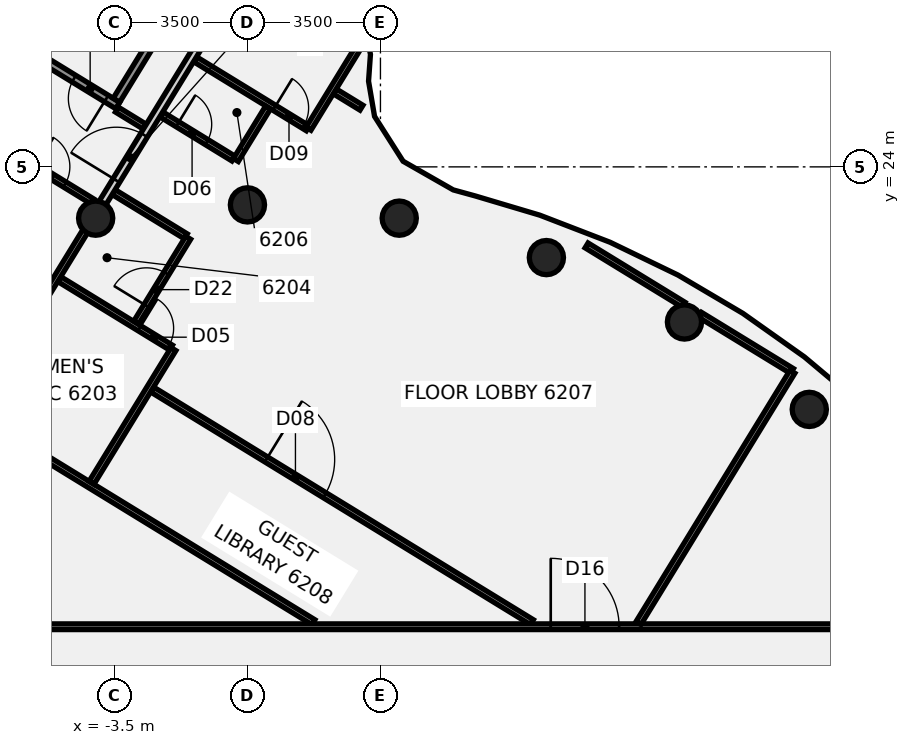
"""IFC4 building model, lengths in metres.
Left out: names, types, materials, properties, quantities, classifications, styles, units other than length and angle.
Written with IfcOpenShell. Run it as: python <this file> out.ifc"""

import sys

from ifc_helpers import new_model, si_unit, direction, frame, frame_2d, origin, origin_2d, place, context, subcontext, project, spatial, rectangle, circle, extrude, element, fill, save


model = new_model("IFC4")
c1 = context("Model", 3, precision=1e-05, world=origin(), true_north=direction((0.0, 1.0)))
c2 = subcontext(c1, "Body", "Model", "MODEL_VIEW")
j1 = project(units=[si_unit("LENGTHUNIT", "METRE"), si_unit("PLANEANGLEUNIT", "RADIAN")], contexts=[c1])
p1 = place(None, origin())
s1 = spatial("IfcSite", under=j1, at=p1, CompositionType="ELEMENT")
p2 = place(p1, origin())
s2 = spatial("IfcBuilding", under=s1, at=p2, CompositionType="ELEMENT")
p3 = place(p2, frame((0.0, 0.0, 245.1)))
s3 = spatial("IfcBuildingStorey", under=s2, at=p3, CompositionType="ELEMENT", Elevation=245.1)
for number, where, z_axis, x_axis in (
    (1, (14.784, 17.619, -0.14), (0.0, 0.0, 1.0), (1.0, 0.0, 0.0)),
    (2, (11.5, 19.919, -0.14), (0.0, 0.0, 1.0), (1.0, 0.0, 0.0)),
    (3, (7.866, 21.613, -0.14), (0.0, 0.0, 1.0), (1.0, 0.0, 0.0)),
    (4, (3.994, 22.651, -0.14), (0.0, 0.0, 1.0), (1.0, 0.0, 0.0)),
    (5, (0.0, 23.0, -0.14), (0.0, 0.0, 1.0), (1.0, 0.0, 0.0)),
    (6, (-3.994, 22.651, -0.14), (0.0, 0.0, 1.0), (1.0, 0.0, 0.0)),
):
    element("IfcColumn", number, at=place(p3, frame(where, z_axis=z_axis, x_axis=x_axis)), inside=s3, PredefinedType="COLUMN", context=c2, shape_type="SweptSolid", body=[
        extrude(circle(Radius=0.45, at=origin_2d()), origin(), (0.0, 0.0, 1.0), 3.6),
    ])
p4 = place(p3, frame((-10.983, 19.815, 0.0), z_axis=(0.0, 0.0, 1.0), x_axis=(0.852616070258, -0.522537880672, 0.0)))
e7 = element("IfcWall", 7, at=p4, inside=s3, PredefinedType="PARTITIONING", context=c2, shape_type="SweptSolid", body=[
    extrude(rectangle(XDim=14.918, YDim=0.15, at=frame_2d((7.459, 0.0))), origin(), (0.0, 0.0, 1.0), 2.864),
])
p5 = place(p3, frame((-11.473, 27.622, 0.0), z_axis=(0.0, 0.0, 1.0), x_axis=(0.852562421737, -0.522625407957, 0.0)))
e8 = element("IfcWall", 8, at=p5, inside=s3, PredefinedType="PARTITIONING", context=c2, shape_type="SweptSolid", body=[
    extrude(rectangle(XDim=8.675, YDim=0.15, at=frame_2d((4.338, 0.0))), origin(), (0.0, 0.0, 1.0), 2.864),
])
p6 = place(p5, frame((6.921, 0.0, 0.0)))
e9 = element("IfcOpeningElement", 9, at=p6, cuts=e8, PredefinedType="OPENING", context=c2, shape_type="SweptSolid", body=[
    extrude(rectangle(XDim=0.9, YDim=2.1, at=frame_2d((0.45, 1.05))), frame((0.0, 0.085, 0.0), z_axis=(0.0, -1.0, 0.0), x_axis=(1.0, 0.0, 0.0)), (0.0, 0.0, 1.0), 0.17),
])
p7 = place(p5, frame((0.52, 0.0, 0.0)))
e10 = element("IfcOpeningElement", 10, at=p7, cuts=e8, PredefinedType="OPENING", context=c2, shape_type="SweptSolid", body=[
    extrude(rectangle(XDim=0.9, YDim=2.1, at=frame_2d((0.45, 1.05))), frame((0.0, 0.085, 0.0), z_axis=(0.0, -1.0, 0.0), x_axis=(1.0, 0.0, 0.0)), (0.0, 0.0, 1.0), 0.17),
])
p8 = place(p3, frame((-3.434, 25.507, 0.0), z_axis=(0.0, 0.0, 1.0), x_axis=(0.852319855047, -0.523020902731, 0.0)))
e11 = element("IfcWall", 11, at=p8, inside=s3, PredefinedType="PARTITIONING", context=c2, shape_type="SweptSolid", body=[
    extrude(rectangle(XDim=0.861, YDim=0.15, at=frame_2d((0.43, 0.0))), origin(), (0.0, 0.0, 1.0), 2.864),
])
p9 = place(p3, frame((-4.948, 21.044, 0.0), z_axis=(0.0, 0.0, 1.0), x_axis=(0.85258902817, -0.52258200222, 0.0)))
e12 = element("IfcWall", 12, at=p9, inside=s3, PredefinedType="PARTITIONING", context=c2, shape_type="SweptSolid", body=[
    extrude(rectangle(XDim=3.445, YDim=0.15, at=frame_2d((1.722, 0.0))), origin(), (0.0, 0.0, 1.0), 2.864),
])
p10 = place(p9, frame((2.469, 0.0, 0.0)))
e13 = element("IfcOpeningElement", 13, at=p10, cuts=e12, PredefinedType="OPENING", context=c2, shape_type="SweptSolid", body=[
    extrude(rectangle(XDim=0.9, YDim=2.1, at=frame_2d((0.45, 1.05))), frame((0.0, 0.085, 0.0), z_axis=(0.0, -1.0, 0.0), x_axis=(1.0, 0.0, 0.0)), (0.0, 0.0, 1.0), 0.17),
])
p11 = place(p3, frame((-2.267, 25.383, 0.0), z_axis=(0.0, 0.0, 1.0), x_axis=(0.852583902446, -0.522590364712, 0.0)))
e14 = element("IfcWall", 14, at=p11, inside=s3, PredefinedType="PARTITIONING", context=c2, shape_type="SweptSolid", body=[
    extrude(rectangle(XDim=2.225, YDim=0.15, at=frame_2d((1.112, 0.0))), origin(), (0.0, 0.0, 1.0), 2.864),
])
p12 = place(p11, frame((0.5, 0.0, 0.0)))
e15 = element("IfcOpeningElement", 15, at=p12, cuts=e14, PredefinedType="OPENING", context=c2, shape_type="SweptSolid", body=[
    extrude(rectangle(XDim=0.9, YDim=2.1, at=frame_2d((0.45, 1.05))), frame((0.0, 0.085, 0.0), z_axis=(0.0, -1.0, 0.0), x_axis=(1.0, 0.0, 0.0)), (0.0, 0.0, 1.0), 0.17),
])
p13 = place(p3, frame((-3.521, 23.336, 0.0), z_axis=(0.0, 0.0, 1.0), x_axis=(0.852703717401, -0.522394841408, 0.0)))
e16 = element("IfcWall", 16, at=p13, inside=s3, PredefinedType="PARTITIONING", context=c2, shape_type="SweptSolid", body=[
    extrude(rectangle(XDim=2.226, YDim=0.15, at=frame_2d((1.113, 0.0))), origin(), (0.0, 0.0, 1.0), 2.864),
])
p14 = place(p3, frame((-2.506, 18.14, 0.0), z_axis=(0.0, 0.0, 1.0), x_axis=(0.85272401736, -0.522361704393, 0.0)))
e17 = element("IfcWall", 17, at=p14, inside=s3, PredefinedType="PARTITIONING", context=c2, shape_type="SweptSolid", body=[
    extrude(rectangle(XDim=11.716, YDim=0.15, at=frame_2d((5.858, 0.0))), origin(), (0.0, 0.0, 1.0), 2.864),
])
p15 = place(p14, frame((3.52, 0.0, 0.0)))
e18 = element("IfcOpeningElement", 18, at=p15, cuts=e17, PredefinedType="OPENING", context=c2, shape_type="SweptSolid", body=[
    extrude(rectangle(XDim=1.8, YDim=2.1, at=frame_2d((0.9, 1.05))), frame((0.0, 0.085, 0.0), z_axis=(0.0, -1.0, 0.0), x_axis=(1.0, 0.0, 0.0)), (0.0, 0.0, 1.0), 0.17),
])
p16 = place(p3, frame((-1.375, 26.829, 0.0), z_axis=(0.0, 0.0, 1.0), x_axis=(0.852802133987, -0.522234162294, 0.0)))
e19 = element("IfcWall", 19, at=p16, inside=s3, PredefinedType="PARTITIONING", context=c2, shape_type="SweptSolid", body=[
    extrude(rectangle(XDim=3.475, YDim=0.15, at=frame_2d((1.737, 0.0))), origin(), (0.0, 0.0, 1.0), 2.864),
])
p17 = place(p16, frame((2.444, 0.0, 0.0)))
e20 = element("IfcOpeningElement", 20, at=p17, cuts=e19, PredefinedType="OPENING", context=c2, shape_type="SweptSolid", body=[
    extrude(rectangle(XDim=0.9, YDim=2.1, at=frame_2d((0.45, 1.05))), frame((0.0, 0.085, 0.0), z_axis=(0.0, -1.0, 0.0), x_axis=(1.0, 0.0, 0.0)), (0.0, 0.0, 1.0), 0.17),
])
p18 = place(p3, frame((2.3, 25.985, 0.0), z_axis=(0.0, 0.0, 1.0), x_axis=(0.852972911954, -0.521955181478, 0.0)))
e21 = element("IfcWall", 21, at=p18, inside=s3, PredefinedType="PARTITIONING", context=c2, shape_type="SweptSolid", body=[
    extrude(rectangle(XDim=0.821, YDim=0.15, at=frame_2d((0.41, 0.0))), origin(), (0.0, 0.0, 1.0), 2.864),
])
p19 = place(p3, frame((8.925, 21.933, 0.0), z_axis=(0.0, 0.0, 1.0), x_axis=(0.853098197907, -0.52175038546, 0.0)))
e22 = element("IfcWall", 22, at=p19, inside=s3, PredefinedType="PARTITIONING", context=c2, shape_type="SweptSolid", body=[
    extrude(rectangle(XDim=2.991, YDim=0.15, at=frame_2d((1.496, 0.0))), origin(), (0.0, 0.0, 1.0), 2.864),
])
p20 = place(p3, frame((11.909, 20.107, 0.0), z_axis=(0.0, 0.0, 1.0), x_axis=(0.853056203986, -0.521819042237, 0.0)))
e23 = element("IfcWall", 23, at=p20, inside=s3, PredefinedType="PARTITIONING", context=c2, shape_type="SweptSolid", body=[
    extrude(rectangle(XDim=2.836, YDim=0.15, at=frame_2d((1.418, 0.0))), origin(), (0.0, 0.0, 1.0), 2.864),
])
p21 = place(p3, frame((-17.065, 11.9, 0.0), z_axis=(0.0, 0.0, 1.0), x_axis=(1.0, 0.0, 0.0)))
e24 = element("IfcWall", 24, at=p21, inside=s3, PredefinedType="PARTITIONING", context=c2, shape_type="SweptSolid", body=[
    extrude(rectangle(XDim=34.165, YDim=0.15, at=frame_2d((17.083, 0.0))), origin(), (0.0, 0.0, 1.0), 2.864),
])
p22 = place(p21, frame((25.046, 0.0, 0.0)))
e25 = element("IfcOpeningElement", 25, at=p22, cuts=e24, PredefinedType="OPENING", context=c2, shape_type="SweptSolid", body=[
    extrude(rectangle(XDim=1.8, YDim=2.1, at=frame_2d((0.9, 1.05))), frame((0.0, 0.085, 0.0), z_axis=(0.0, -1.0, 0.0), x_axis=(1.0, 0.0, 0.0)), (0.0, 0.0, 1.0), 0.17),
])
p23 = place(p21, frame((9.79, 0.0, 0.0)))
e26 = element("IfcOpeningElement", 26, at=p23, cuts=e24, PredefinedType="OPENING", context=c2, shape_type="SweptSolid", body=[
    extrude(rectangle(XDim=1.8, YDim=2.1, at=frame_2d((0.9, 1.05))), frame((0.0, 0.085, 0.0), z_axis=(0.0, -1.0, 0.0), x_axis=(1.0, 0.0, 0.0)), (0.0, 0.0, 1.0), 0.17),
])
p24 = place(p21, frame((2.59, 0.0, 0.0)))
e27 = element("IfcOpeningElement", 27, at=p24, cuts=e24, PredefinedType="OPENING", context=c2, shape_type="SweptSolid", body=[
    extrude(rectangle(XDim=1.8, YDim=2.1, at=frame_2d((0.9, 1.05))), frame((0.0, 0.085, 0.0), z_axis=(0.0, -1.0, 0.0), x_axis=(1.0, 0.0, 0.0)), (0.0, 0.0, 1.0), 0.17),
])
p25 = place(p3, frame((-2.928, 19.9, 0.0), z_axis=(0.0, 0.0, 1.0), x_axis=(0.522557687872, 0.852603930818, 0.0)))
e28 = element("IfcWall", 28, at=p25, inside=s3, PredefinedType="PARTITIONING", context=c2, shape_type="SweptSolid", body=[
    extrude(rectangle(XDim=2.62, YDim=0.15, at=frame_2d((1.31, 0.0))), origin(), (0.0, 0.0, 1.0), 2.864),
])
p26 = place(p25, frame((0.52, 0.0, 0.0)))
e29 = element("IfcOpeningElement", 29, at=p26, cuts=e28, PredefinedType="OPENING", context=c2, shape_type="SweptSolid", body=[
    extrude(rectangle(XDim=1.0, YDim=2.1, at=frame_2d((0.5, 1.05))), frame((0.0, 0.085, 0.0), z_axis=(0.0, -1.0, 0.0), x_axis=(1.0, 0.0, 0.0)), (0.0, 0.0, 1.0), 0.17),
])
p27 = place(p3, frame((-0.305, 24.18, 0.0), z_axis=(0.0, 0.0, 1.0), x_axis=(0.522516127408, 0.852629401674, 0.0)))
e30 = element("IfcWall", 30, at=p27, inside=s3, PredefinedType="PARTITIONING", context=c2, shape_type="SweptSolid", body=[
    extrude(rectangle(XDim=1.62, YDim=0.15, at=frame_2d((0.81, 0.0))), origin(), (0.0, 0.0, 1.0), 2.864),
])
p28 = place(p3, frame((-7.17, 17.573, 0.0), z_axis=(0.0, 0.0, 1.0), x_axis=(0.522586882087, 0.852586037107, 0.0)))
e31 = element("IfcWall", 31, at=p28, inside=s3, PredefinedType="PARTITIONING", context=c2, shape_type="SweptSolid", body=[
    extrude(rectangle(XDim=5.765, YDim=0.15, at=frame_2d((2.883, 0.0))), origin(), (0.0, 0.0, 1.0), 2.864),
])
p29 = place(p3, frame((-3.922, 22.872, 0.0), z_axis=(0.0, 0.0, 1.0), x_axis=(0.522556335617, 0.852604759608, 0.0)))
e32 = element("IfcWall", 32, at=p29, inside=s3, PredefinedType="PARTITIONING", context=c2, shape_type="SweptSolid", body=[
    extrude(rectangle(XDim=8.004, YDim=0.2, at=frame_2d((4.002, 0.0))), origin(), (0.0, 0.0, 1.0), 2.864),
])
p30 = place(p29, frame((0.905, 0.0, 0.0)))
e33 = element("IfcOpeningElement", 33, at=p30, cuts=e32, PredefinedType="OPENING", context=c2, shape_type="SweptSolid", body=[
    extrude(rectangle(XDim=1.4, YDim=2.1, at=frame_2d((0.7, 1.05))), frame((0.0, 0.11, 0.0), z_axis=(0.0, -1.0, 0.0), x_axis=(1.0, 0.0, 0.0)), (0.0, 0.0, 1.0), 0.22),
])
p31 = place(p3, frame((-4.102, 15.688, 0.0), z_axis=(0.0, 0.0, 1.0), x_axis=(0.522524582704, 0.852624219965, 0.0)))
e34 = element("IfcWall", 34, at=p31, inside=s3, PredefinedType="PARTITIONING", context=c2, shape_type="SweptSolid", body=[
    extrude(rectangle(XDim=4.125, YDim=0.15, at=frame_2d((2.062, 0.0))), origin(), (0.0, 0.0, 1.0), 2.864),
])
p32 = place(p3, frame((1.607, 25.003, 0.0), z_axis=(0.0, 0.0, 1.0), x_axis=(0.522543541311, 0.852612601029, 0.0)))
e35 = element("IfcWall", 35, at=p32, inside=s3, PredefinedType="PARTITIONING", context=c2, shape_type="SweptSolid", body=[
    extrude(rectangle(XDim=2.473, YDim=0.15, at=frame_2d((1.237, 0.0))), origin(), (0.0, 0.0, 1.0), 2.864),
])
p33 = place(p3, frame((10.291, 11.998, 0.0), z_axis=(0.0, 0.0, 1.0), x_axis=(0.522397377653, 0.852702163608, 0.0)))
e36 = element("IfcWall", 36, at=p33, inside=s3, PredefinedType="PARTITIONING", context=c2, shape_type="SweptSolid", body=[
    extrude(rectangle(XDim=7.753, YDim=0.15, at=frame_2d((3.876, 0.0))), origin(), (0.0, 0.0, 1.0), 2.864),
])
p34 = place(p3, frame((-3.414, 25.616, -0.14), z_axis=(0.0, 0.0, 1.0), x_axis=(-0.852723778583, 0.522362094183, 0.0)))
e37 = element("IfcWall", 37, at=p34, inside=s3, PredefinedType="SHEAR", context=c2, shape_type="SweptSolid", body=[
    extrude(rectangle(XDim=6.7, YDim=0.2, at=frame_2d((3.35, 0.0))), origin(), (0.0, 0.0, 1.0), 3.004),
])
p35 = place(p34, frame((0.35, 0.0, 0.0)))
e38 = element("IfcOpeningElement", 38, at=p35, cuts=e37, PredefinedType="OPENING", context=c2, shape_type="SweptSolid", body=[
    extrude(rectangle(XDim=1.0, YDim=2.1, at=frame_2d((0.5, 1.05))), frame((0.0, 0.11, 0.0), z_axis=(0.0, -1.0, 0.0), x_axis=(1.0, 0.0, 0.0)), (0.0, 0.0, 1.0), 0.22),
])
p36 = place(p3, frame((-1.775, 28.482, -0.14), z_axis=(0.0, 0.0, 1.0), x_axis=(-0.52237241109, -0.852717458559, 0.0)))
e39 = element("IfcWall", 39, at=p36, inside=s3, PredefinedType="SHEAR", context=c2, shape_type="SweptSolid", body=[
    extrude(rectangle(XDim=3.2, YDim=0.2, at=frame_2d((1.6, 0.0))), origin(), (0.0, 0.0, 1.0), 3.6),
])
p37 = place(p6, frame((0.9, 0.0, 0.0), z_axis=(0.0, 0.0, 1.0), x_axis=(-1.0, 0.0, 0.0)))
e40 = element("IfcDoor", 40, at=p37, inside=s3, OperationType="SINGLE_SWING_RIGHT", PredefinedType="DOOR", context=c2, shape_type="SweptSolid", body=[
    extrude(rectangle(XDim=0.9, YDim=2.1, at=frame_2d((0.45, 1.05))), frame((0.0, 0.025, 0.0), z_axis=(0.0, -1.0, 0.0), x_axis=(1.0, 0.0, 0.0)), (0.0, 0.0, 1.0), 0.05),
])
fill(e9, e40)
p38 = place(p10, frame((0.9, 0.0, 0.0), z_axis=(0.0, 0.0, 1.0), x_axis=(-1.0, 0.0, 0.0)))
e41 = element("IfcDoor", 41, at=p38, inside=s3, OperationType="SINGLE_SWING_RIGHT", PredefinedType="DOOR", context=c2, shape_type="SweptSolid", body=[
    extrude(rectangle(XDim=0.9, YDim=2.1, at=frame_2d((0.45, 1.05))), frame((0.0, 0.025, 0.0), z_axis=(0.0, -1.0, 0.0), x_axis=(1.0, 0.0, 0.0)), (0.0, 0.0, 1.0), 0.05),
])
fill(e13, e41)
p39 = place(p12, origin())
e42 = element("IfcDoor", 42, at=p39, inside=s3, OperationType="SINGLE_SWING_RIGHT", PredefinedType="DOOR", context=c2, shape_type="SweptSolid", body=[
    extrude(rectangle(XDim=0.9, YDim=2.1, at=frame_2d((0.45, 1.05))), frame((0.0, 0.025, 0.0), z_axis=(0.0, -1.0, 0.0), x_axis=(1.0, 0.0, 0.0)), (0.0, 0.0, 1.0), 0.05),
])
fill(e15, e42)
p40 = place(p15, frame((1.8, 0.0, 0.0), z_axis=(0.0, 0.0, 1.0), x_axis=(-1.0, 0.0, 0.0)))
e43 = element("IfcDoor", 43, at=p40, inside=s3, OperationType="DOUBLE_DOOR_SINGLE_SWING", PredefinedType="DOOR", context=c2, shape_type="SweptSolid", body=[
    extrude(rectangle(XDim=1.8, YDim=2.1, at=frame_2d((0.9, 1.05))), frame((0.0, 0.025, 0.0), z_axis=(0.0, -1.0, 0.0), x_axis=(1.0, 0.0, 0.0)), (0.0, 0.0, 1.0), 0.05),
])
fill(e18, e43)
p41 = place(p17, origin())
e44 = element("IfcDoor", 44, at=p41, inside=s3, OperationType="SINGLE_SWING_LEFT", PredefinedType="DOOR", context=c2, shape_type="SweptSolid", body=[
    extrude(rectangle(XDim=0.9, YDim=2.1, at=frame_2d((0.45, 1.05))), frame((0.0, 0.025, 0.0), z_axis=(0.0, -1.0, 0.0), x_axis=(1.0, 0.0, 0.0)), (0.0, 0.0, 1.0), 0.05),
])
fill(e20, e44)
p42 = place(p22, frame((1.8, 0.0, 0.0), z_axis=(0.0, 0.0, 1.0), x_axis=(-1.0, 0.0, 0.0)))
e45 = element("IfcDoor", 45, at=p42, inside=s3, OperationType="DOUBLE_DOOR_SINGLE_SWING", PredefinedType="DOOR", context=c2, shape_type="SweptSolid", body=[
    extrude(rectangle(XDim=1.8, YDim=2.1, at=frame_2d((0.9, 1.05))), frame((0.0, 0.025, 0.0), z_axis=(0.0, -1.0, 0.0), x_axis=(1.0, 0.0, 0.0)), (0.0, 0.0, 1.0), 0.05),
])
fill(e25, e45)
p43 = place(p26, origin())
e46 = element("IfcDoor", 46, at=p43, inside=s3, OperationType="SINGLE_SWING_RIGHT", PredefinedType="DOOR", context=c2, shape_type="SweptSolid", body=[
    extrude(rectangle(XDim=1.0, YDim=2.1, at=frame_2d((0.5, 1.05))), frame((0.0, 0.025, 0.0), z_axis=(0.0, -1.0, 0.0), x_axis=(1.0, 0.0, 0.0)), (0.0, 0.0, 1.0), 0.05),
])
fill(e29, e46)
p44 = place(p30, frame((1.4, 0.0, 0.0), z_axis=(0.0, 0.0, 1.0), x_axis=(-1.0, 0.0, 0.0)))
e47 = element("IfcDoor", 47, at=p44, inside=s3, OperationType="DOUBLE_DOOR_SINGLE_SWING", PredefinedType="DOOR", context=c2, shape_type="SweptSolid", body=[
    extrude(rectangle(XDim=1.4, YDim=2.1, at=frame_2d((0.7, 1.05))), frame((0.0, 0.025, 0.0), z_axis=(0.0, -1.0, 0.0), x_axis=(1.0, 0.0, 0.0)), (0.0, 0.0, 1.0), 0.05),
])
fill(e33, e47)
p45 = place(p35, origin())
e48 = element("IfcDoor", 48, at=p45, inside=s3, OperationType="SINGLE_SWING_LEFT", PredefinedType="DOOR", context=c2, shape_type="SweptSolid", body=[
    extrude(rectangle(XDim=1.0, YDim=2.1, at=frame_2d((0.5, 1.05))), frame((0.0, 0.025, 0.0), z_axis=(0.0, -1.0, 0.0), x_axis=(1.0, 0.0, 0.0)), (0.0, 0.0, 1.0), 0.05),
])
fill(e38, e48)
save(model, sys.argv[1])
